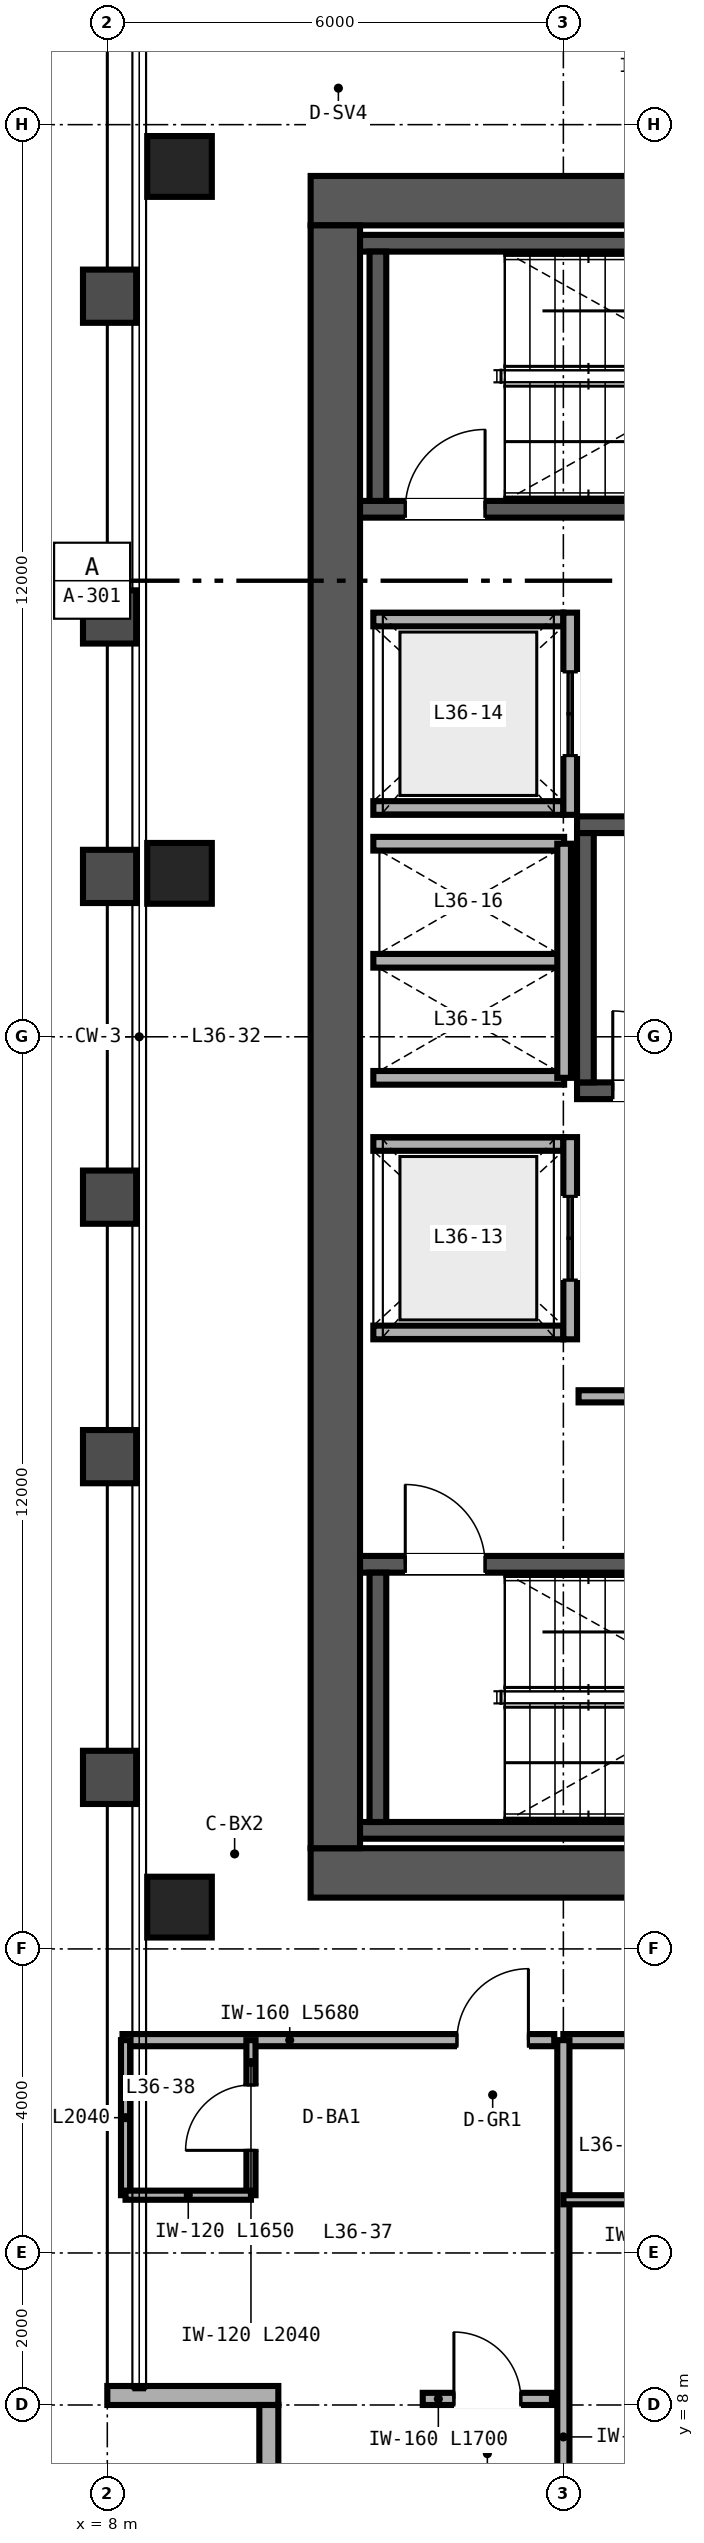
"""IFC4 building model, lengths in metres.
Left out: names, types, materials, properties, quantities, classifications, styles, units other than length and angle.
Written with IfcOpenShell. Run it as: python <this file> out.ifc"""

import sys

from ifc_helpers import new_model, si_unit, direction, frame, frame_2d, origin, origin_2d, place, context, subcontext, project, spatial, rectangle, hollow_rectangle, extrude, source, transform, mapped, element, fill, save


model = new_model("IFC4")
c1 = context("Model", 3, precision=1e-05, world=origin(), true_north=direction((0.0, 1.0)))
c2 = subcontext(c1, "Body", "Model", "MODEL_VIEW")
j1 = project(units=[si_unit("LENGTHUNIT", "METRE"), si_unit("PLANEANGLEUNIT", "RADIAN")], contexts=[c1])
p1 = place(None, origin())
s1 = spatial("IfcSite", under=j1, at=p1, CompositionType="ELEMENT")
p2 = place(p1, origin())
s2 = spatial("IfcBuilding", under=s1, at=p2, CompositionType="ELEMENT")
p3 = place(p2, frame((0.0, 0.0, 144.0)))
s3 = spatial("IfcBuildingStorey", under=s2, at=p3, CompositionType="ELEMENT", Elevation=144.0)
p4 = place(p3, frame((10.675, 15.0, 0.0), z_axis=(0.0, 0.0, 1.0), x_axis=(1.0, 0.0, 0.0)))
e1 = element("IfcWall", 1, at=p4, inside=s3, PredefinedType="SHEAR", context=c2, shape_type="SweptSolid", body=[
    extrude(rectangle(XDim=12.65, YDim=0.65, at=frame_2d((6.325, 0.0))), origin(), (0.0, 0.0, 1.0), 3.36),
])
p5 = place(p4, frame((10.225, 0.0, 0.0)))
e2 = element("IfcOpeningElement", 2, at=p5, cuts=e1, PredefinedType="OPENING", context=c2, shape_type="SweptSolid", body=[
    extrude(rectangle(XDim=1.0, YDim=2.15, at=frame_2d((0.5, 1.075))), frame((0.0, 0.335, 0.0), z_axis=(0.0, -1.0, 0.0), x_axis=(1.0, 0.0, 0.0)), (0.0, 0.0, 1.0), 0.67),
])
p6 = place(p3, frame((10.675, 37.0, 0.0), z_axis=(0.0, 0.0, 1.0), x_axis=(1.0, 0.0, 0.0)))
e3 = element("IfcWall", 3, at=p6, inside=s3, PredefinedType="SHEAR", context=c2, shape_type="SweptSolid", body=[
    extrude(rectangle(XDim=12.65, YDim=0.65, at=frame_2d((6.325, 0.0))), origin(), (0.0, 0.0, 1.0), 3.36),
])
p7 = place(p6, frame((10.425, 0.0, 0.0)))
e4 = element("IfcOpeningElement", 4, at=p7, cuts=e3, PredefinedType="OPENING", context=c2, shape_type="SweptSolid", body=[
    extrude(rectangle(XDim=1.0, YDim=2.15, at=frame_2d((0.5, 1.075))), frame((0.0, 0.335, 0.0), z_axis=(0.0, -1.0, 0.0), x_axis=(1.0, 0.0, 0.0)), (0.0, 0.0, 1.0), 0.67),
])
p8 = place(p3, frame((11.0, 15.325, 0.0), z_axis=(0.0, 0.0, 1.0), x_axis=(0.0, 1.0, 0.0)))
e5 = element("IfcWall", 5, at=p8, inside=s3, PredefinedType="SHEAR", context=c2, shape_type="SweptSolid", body=[
    extrude(rectangle(XDim=21.35, YDim=0.65, at=frame_2d((10.675, 0.0))), origin(), (0.0, 0.0, 1.0), 3.36),
])
p9 = place(p3, frame((11.325, 15.56, 0.0), z_axis=(0.0, 0.0, 1.0), x_axis=(1.0, 0.0, 0.0)))
e6 = element("IfcWall", 6, at=p9, inside=s3, PredefinedType="SHEAR", context=c2, shape_type="SweptSolid", body=[
    extrude(rectangle(XDim=7.985, YDim=0.22, at=frame_2d((3.993, 0.0))), origin(), (0.0, 0.0, 1.0), 3.4),
])
p10 = place(p3, frame((11.325, 19.06, 0.0), z_axis=(0.0, 0.0, 1.0), x_axis=(1.0, 0.0, 0.0)))
e7 = element("IfcWall", 7, at=p10, inside=s3, PredefinedType="SHEAR", context=c2, shape_type="SweptSolid", body=[
    extrude(rectangle(XDim=7.985, YDim=0.22, at=frame_2d((3.993, 0.0))), origin(), (0.0, 0.0, 1.0), 3.4),
])
p11 = place(p10, frame((0.595, 0.0, 0.0)))
e8 = element("IfcOpeningElement", 8, at=p11, cuts=e7, PredefinedType="OPENING", context=c2, shape_type="SweptSolid", body=[
    extrude(rectangle(XDim=1.05, YDim=2.15, at=frame_2d((0.525, 1.075))), frame((0.0, 0.12, 0.0), z_axis=(0.0, -1.0, 0.0), x_axis=(1.0, 0.0, 0.0)), (0.0, 0.0, 1.0), 0.24),
])
p12 = place(p3, frame((11.56, 15.67, 0.0), z_axis=(0.0, 0.0, 1.0), x_axis=(0.0, 1.0, 0.0)))
e9 = element("IfcWall", 9, at=p12, inside=s3, PredefinedType="SHEAR", context=c2, shape_type="SweptSolid", body=[
    extrude(rectangle(XDim=3.28, YDim=0.22, at=frame_2d((1.64, 0.0))), origin(), (0.0, 0.0, 1.0), 3.4),
])
p13 = place(p3, frame((11.325, 32.94, 0.0), z_axis=(0.0, 0.0, 1.0), x_axis=(1.0, 0.0, 0.0)))
e10 = element("IfcWall", 10, at=p13, inside=s3, PredefinedType="SHEAR", context=c2, shape_type="SweptSolid", body=[
    extrude(rectangle(XDim=7.985, YDim=0.22, at=frame_2d((3.993, 0.0))), origin(), (0.0, 0.0, 1.0), 3.4),
])
p14 = place(p13, frame((0.595, 0.0, 0.0)))
e11 = element("IfcOpeningElement", 11, at=p14, cuts=e10, PredefinedType="OPENING", context=c2, shape_type="SweptSolid", body=[
    extrude(rectangle(XDim=1.05, YDim=2.15, at=frame_2d((0.525, 1.075))), frame((0.0, 0.12, 0.0), z_axis=(0.0, -1.0, 0.0), x_axis=(1.0, 0.0, 0.0)), (0.0, 0.0, 1.0), 0.24),
])
p15 = place(p3, frame((11.325, 36.44, 0.0), z_axis=(0.0, 0.0, 1.0), x_axis=(1.0, 0.0, 0.0)))
e12 = element("IfcWall", 12, at=p15, inside=s3, PredefinedType="SHEAR", context=c2, shape_type="SweptSolid", body=[
    extrude(rectangle(XDim=7.985, YDim=0.22, at=frame_2d((3.993, 0.0))), origin(), (0.0, 0.0, 1.0), 3.4),
])
p16 = place(p3, frame((11.56, 33.05, 0.0), z_axis=(0.0, 0.0, 1.0), x_axis=(0.0, 1.0, 0.0)))
e13 = element("IfcWall", 13, at=p16, inside=s3, PredefinedType="SHEAR", context=c2, shape_type="SweptSolid", body=[
    extrude(rectangle(XDim=3.28, YDim=0.22, at=frame_2d((1.64, 0.0))), origin(), (0.0, 0.0, 1.0), 3.4),
])
p17 = place(p3, frame((14.18, 25.29, 0.0), z_axis=(0.0, 0.0, 1.0), x_axis=(1.0, 0.0, 0.0)))
e14 = element("IfcWall", 14, at=p17, inside=s3, PredefinedType="SHEAR", context=c2, shape_type="SweptSolid", body=[
    extrude(rectangle(XDim=8.495, YDim=0.22, at=frame_2d((4.248, 0.0))), origin(), (0.0, 0.0, 1.0), 3.4),
])
p18 = place(p17, frame((0.47, 0.0, 0.0)))
e15 = element("IfcOpeningElement", 15, at=p18, cuts=e14, PredefinedType="OPENING", context=c2, shape_type="SweptSolid", body=[
    extrude(rectangle(XDim=1.05, YDim=2.15, at=frame_2d((0.525, 1.075))), frame((0.0, 0.12, 0.0), z_axis=(0.0, -1.0, 0.0), x_axis=(1.0, 0.0, 0.0)), (0.0, 0.0, 1.0), 0.24),
])
p19 = place(p3, frame((14.18, 28.79, 0.0), z_axis=(0.0, 0.0, 1.0), x_axis=(1.0, 0.0, 0.0)))
e16 = element("IfcWall", 16, at=p19, inside=s3, PredefinedType="SHEAR", context=c2, shape_type="SweptSolid", body=[
    extrude(rectangle(XDim=8.495, YDim=0.22, at=frame_2d((4.248, 0.0))), origin(), (0.0, 0.0, 1.0), 3.4),
])
p20 = place(p3, frame((14.29, 25.4, 0.0), z_axis=(0.0, 0.0, 1.0), x_axis=(0.0, 1.0, 0.0)))
e17 = element("IfcWall", 17, at=p20, inside=s3, PredefinedType="SHEAR", context=c2, shape_type="SweptSolid", body=[
    extrude(rectangle(XDim=3.28, YDim=0.22, at=frame_2d((1.64, 0.0))), origin(), (0.0, 0.0, 1.0), 3.4),
])
m1 = source(origin(), c2, "Body", "SweptSolid", [
    extrude(hollow_rectangle(XDim=0.85, YDim=0.8, WallThickness=0.032, at=origin_2d()), origin(), (0.0, 0.0, 1.0), 3.36),
])
for number, where, z_axis, x_axis in (
    (18, (8.95, 14.55, 0.0), (0.0, 0.0, 1.0), (1.0, 0.0, 0.0)),
    (19, (8.95, 28.15, 0.0), (0.0, 0.0, 1.0), (1.0, 0.0, 0.0)),
    (20, (8.95, 37.45, 0.0), (0.0, 0.0, 1.0), (1.0, 0.0, 0.0)),
):
    element("IfcColumn", number, at=place(p3, frame(where, z_axis=z_axis, x_axis=x_axis)), inside=s3, PredefinedType="COLUMN", context=c2, shape_type="MappedRepresentation", body=[
        mapped(m1, transform((0.0, 0.0, 0.0), scale=1.0)),
    ])
p21 = place(p3, frame((8.0, 8.125, 0.0), z_axis=(0.0, 0.0, 1.0), x_axis=(1.0, 0.0, 0.0)))
e21 = element("IfcWall", 21, at=p21, inside=s3, PredefinedType="SOLIDWALL", context=c2, shape_type="SweptSolid", body=[
    extrude(rectangle(XDim=2.25, YDim=0.25, at=frame_2d((1.125, 0.0))), origin(), (0.0, 0.0, 1.0), 3.36),
])
p22 = place(p3, frame((10.125, 8.0, 0.0), z_axis=(0.0, 0.0, 1.0), x_axis=(0.0, -1.0, 0.0)))
e22 = element("IfcWall", 22, at=p22, inside=s3, PredefinedType="SOLIDWALL", context=c2, shape_type="SweptSolid", body=[
    extrude(rectangle(XDim=2.0, YDim=0.25, at=frame_2d((1.0, 0.0))), origin(), (0.0, 0.0, 1.0), 3.36),
])
for number, where, z_axis, x_axis in (
    (23, (11.5, 22.11, 0.0), (0.0, 0.0, 1.0), (1.0, 0.0, 0.0)),
    (24, (11.5, 24.59, 0.0), (0.0, 0.0, 1.0), (1.0, 0.0, 0.0)),
):
    element("IfcWall", number, at=place(p3, frame(where, z_axis=z_axis, x_axis=x_axis)), inside=s3, PredefinedType="SOLIDWALL", context=c2, shape_type="SweptSolid", body=[
        extrude(rectangle(XDim=2.5, YDim=0.18, at=frame_2d((1.25, 0.0))), origin(), (0.0, 0.0, 1.0), 3.36),
    ])
p23 = place(p3, frame((14.09, 22.02, 0.0), z_axis=(0.0, 0.0, 1.0), x_axis=(0.0, 1.0, 0.0)))
e25 = element("IfcWall", 25, at=p23, inside=s3, PredefinedType="SOLIDWALL", context=c2, shape_type="SweptSolid", body=[
    extrude(rectangle(XDim=2.66, YDim=0.18, at=frame_2d((1.33, 0.0))), origin(), (0.0, 0.0, 1.0), 3.36),
])
p24 = place(p23, frame((0.78, 0.0, 0.0)))
e26 = element("IfcOpeningElement", 26, at=p24, cuts=e25, PredefinedType="OPENING", context=c2, shape_type="SweptSolid", body=[
    extrude(rectangle(XDim=1.1, YDim=2.2, at=frame_2d((0.55, 1.1))), frame((0.0, 0.1, 0.0), z_axis=(0.0, -1.0, 0.0), x_axis=(1.0, 0.0, 0.0)), (0.0, 0.0, 1.0), 0.2),
])
for number, where, z_axis, x_axis in (
    (27, (11.5, 29.01, 0.0), (0.0, 0.0, 1.0), (1.0, 0.0, 0.0)),
    (28, (11.5, 31.49, 0.0), (0.0, 0.0, 1.0), (1.0, 0.0, 0.0)),
):
    element("IfcWall", number, at=place(p3, frame(where, z_axis=z_axis, x_axis=x_axis)), inside=s3, PredefinedType="SOLIDWALL", context=c2, shape_type="SweptSolid", body=[
        extrude(rectangle(XDim=2.5, YDim=0.18, at=frame_2d((1.25, 0.0))), origin(), (0.0, 0.0, 1.0), 3.36),
    ])
p25 = place(p3, frame((14.09, 28.92, 0.0), z_axis=(0.0, 0.0, 1.0), x_axis=(0.0, 1.0, 0.0)))
e29 = element("IfcWall", 29, at=p25, inside=s3, PredefinedType="SOLIDWALL", context=c2, shape_type="SweptSolid", body=[
    extrude(rectangle(XDim=2.66, YDim=0.18, at=frame_2d((1.33, 0.0))), origin(), (0.0, 0.0, 1.0), 3.36),
])
p26 = place(p25, frame((0.78, 0.0, 0.0)))
e30 = element("IfcOpeningElement", 30, at=p26, cuts=e29, PredefinedType="OPENING", context=c2, shape_type="SweptSolid", body=[
    extrude(rectangle(XDim=1.1, YDim=2.2, at=frame_2d((0.55, 1.1))), frame((0.0, 0.1, 0.0), z_axis=(0.0, -1.0, 0.0), x_axis=(1.0, 0.0, 0.0)), (0.0, 0.0, 1.0), 0.2),
])
for number, where, z_axis, x_axis in (
    (31, (11.5, 25.46, 0.0), (0.0, 0.0, 1.0), (1.0, 0.0, 0.0)),
    (32, (11.5, 27.0, 0.0), (0.0, 0.0, 1.0), (1.0, 0.0, 0.0)),
    (33, (11.5, 28.54, 0.0), (0.0, 0.0, 1.0), (1.0, 0.0, 0.0)),
):
    element("IfcWall", number, at=place(p3, frame(where, z_axis=z_axis, x_axis=x_axis)), inside=s3, PredefinedType="SOLIDWALL", context=c2, shape_type="SweptSolid", body=[
        extrude(rectangle(XDim=2.51, YDim=0.18, at=frame_2d((1.255, 0.0))), origin(), (0.0, 0.0, 1.0), 3.36),
    ])
p27 = place(p3, frame((14.01, 25.46, 0.0), z_axis=(0.0, 0.0, 1.0), x_axis=(0.0, 1.0, 0.0)))
e34 = element("IfcWall", 34, at=p27, inside=s3, PredefinedType="SOLIDWALL", context=c2, shape_type="SweptSolid", body=[
    extrude(rectangle(XDim=3.08, YDim=0.18, at=frame_2d((1.54, 0.0))), origin(), (0.0, 0.0, 1.0), 3.36),
])
p28 = place(p3, frame((14.2, 21.27, 0.0), z_axis=(0.0, 0.0, 1.0), x_axis=(1.0, 0.0, 0.0)))
e35 = element("IfcWall", 35, at=p28, inside=s3, PredefinedType="PARTITIONING", context=c2, shape_type="SweptSolid", body=[
    extrude(rectangle(XDim=4.58, YDim=0.16, at=frame_2d((2.29, 0.0))), origin(), (0.0, 0.0, 1.0), 3.36),
])
p29 = place(p28, frame((1.8, 0.0, 0.0)))
e36 = element("IfcOpeningElement", 36, at=p29, cuts=e35, PredefinedType="OPENING", context=c2, shape_type="SweptSolid", body=[
    extrude(rectangle(XDim=1.0, YDim=2.15, at=frame_2d((0.5, 1.075))), frame((0.0, 0.09, 0.0), z_axis=(0.0, -1.0, 0.0), x_axis=(1.0, 0.0, 0.0)), (0.0, 0.0, 1.0), 0.18),
])
p30 = place(p3, frame((8.2, 12.8, 0.0), z_axis=(0.0, 0.0, 1.0), x_axis=(1.0, 0.0, 0.0)))
e37 = element("IfcWall", 37, at=p30, inside=s3, PredefinedType="PARTITIONING", context=c2, shape_type="SweptSolid", body=[
    extrude(rectangle(XDim=5.68, YDim=0.16, at=frame_2d((2.84, 0.0))), origin(), (0.0, 0.0, 1.0), 3.36),
])
p31 = place(p30, frame((4.4, 0.0, 0.0)))
e38 = element("IfcOpeningElement", 38, at=p31, cuts=e37, PredefinedType="OPENING", context=c2, shape_type="SweptSolid", body=[
    extrude(rectangle(XDim=0.94, YDim=2.15, at=frame_2d((0.47, 1.075))), frame((0.0, 0.09, 0.0), z_axis=(0.0, -1.0, 0.0), x_axis=(1.0, 0.0, 0.0)), (0.0, 0.0, 1.0), 0.18),
])
p32 = place(p3, frame((9.89, 10.76, 0.0), z_axis=(0.0, 0.0, 1.0), x_axis=(0.0, 1.0, 0.0)))
e39 = element("IfcWall", 39, at=p32, inside=s3, PredefinedType="PARTITIONING", context=c2, shape_type="SweptSolid", body=[
    extrude(rectangle(XDim=2.04, YDim=0.12, at=frame_2d((1.02, 0.0))), origin(), (0.0, 0.0, 1.0), 3.36),
])
p33 = place(p32, frame((0.59, 0.0, 0.0)))
e40 = element("IfcOpeningElement", 40, at=p33, cuts=e39, PredefinedType="OPENING", context=c2, shape_type="SweptSolid", body=[
    extrude(rectangle(XDim=0.86, YDim=2.1, at=frame_2d((0.43, 1.05))), frame((0.0, 0.07, 0.0), z_axis=(0.0, -1.0, 0.0), x_axis=(1.0, 0.0, 0.0)), (0.0, 0.0, 1.0), 0.14),
])
p34 = place(p3, frame((8.24, 10.76, 0.0), z_axis=(0.0, 0.0, 1.0), x_axis=(0.0, 1.0, 0.0)))
e41 = element("IfcWall", 41, at=p34, inside=s3, PredefinedType="PARTITIONING", context=c2, shape_type="SweptSolid", body=[
    extrude(rectangle(XDim=2.04, YDim=0.12, at=frame_2d((1.02, 0.0))), origin(), (0.0, 0.0, 1.0), 3.36),
])
p35 = place(p3, frame((8.24, 10.76, 0.0), z_axis=(0.0, 0.0, 1.0), x_axis=(1.0, 0.0, 0.0)))
e42 = element("IfcWall", 42, at=p35, inside=s3, PredefinedType="PARTITIONING", context=c2, shape_type="SweptSolid", body=[
    extrude(rectangle(XDim=1.65, YDim=0.12, at=frame_2d((0.825, 0.0))), origin(), (0.0, 0.0, 1.0), 3.36),
])
p36 = place(p3, frame((12.15, 8.08, 0.0), z_axis=(0.0, 0.0, 1.0), x_axis=(1.0, 0.0, 0.0)))
e43 = element("IfcWall", 43, at=p36, inside=s3, PredefinedType="PARTITIONING", context=c2, shape_type="SweptSolid", body=[
    extrude(rectangle(XDim=1.7, YDim=0.16, at=frame_2d((0.85, 0.0))), origin(), (0.0, 0.0, 1.0), 3.36),
])
p37 = place(p36, frame((0.41, 0.0, 0.0)))
e44 = element("IfcOpeningElement", 44, at=p37, cuts=e43, PredefinedType="OPENING", context=c2, shape_type="SweptSolid", body=[
    extrude(rectangle(XDim=0.88, YDim=2.15, at=frame_2d((0.44, 1.075))), frame((0.0, 0.09, 0.0), z_axis=(0.0, -1.0, 0.0), x_axis=(1.0, 0.0, 0.0)), (0.0, 0.0, 1.0), 0.18),
])
p38 = place(p3, frame((14.0, 12.8, 0.0), z_axis=(0.0, 0.0, 1.0), x_axis=(1.0, 0.0, 0.0)))
e45 = element("IfcWall", 45, at=p38, inside=s3, PredefinedType="PARTITIONING", context=c2, shape_type="SweptSolid", body=[
    extrude(rectangle(XDim=36.0, YDim=0.16, at=frame_2d((18.0, 0.0))), origin(), (0.0, 0.0, 1.0), 2.581),
])
p39 = place(p38, frame((5.5, 0.0, 0.0)))
e46 = element("IfcOpeningElement", 46, at=p39, cuts=e45, PredefinedType="OPENING", context=c2, shape_type="SweptSolid", body=[
    extrude(rectangle(XDim=0.98, YDim=2.2, at=frame_2d((0.49, 1.1))), frame((0.0, 0.09, 0.0), z_axis=(0.0, -1.0, 0.0), x_axis=(1.0, 0.0, 0.0)), (0.0, 0.0, 1.0), 0.18),
])
p40 = place(p38, frame((10.2, 0.0, 0.0)))
e47 = element("IfcOpeningElement", 47, at=p40, cuts=e45, PredefinedType="OPENING", context=c2, shape_type="SweptSolid", body=[
    extrude(rectangle(XDim=0.96, YDim=2.15, at=frame_2d((0.48, 1.075))), frame((0.0, 0.09, 0.0), z_axis=(0.0, -1.0, 0.0), x_axis=(1.0, 0.0, 0.0)), (0.0, 0.0, 1.0), 0.18),
])
p41 = place(p38, frame((16.72, 0.0, 0.0)))
e48 = element("IfcOpeningElement", 48, at=p41, cuts=e45, PredefinedType="OPENING", context=c2, shape_type="SweptSolid", body=[
    extrude(rectangle(XDim=0.96, YDim=2.15, at=frame_2d((0.48, 1.075))), frame((0.0, 0.09, 0.0), z_axis=(0.0, -1.0, 0.0), x_axis=(1.0, 0.0, 0.0)), (0.0, 0.0, 1.0), 0.18),
])
p42 = place(p38, frame((27.14, 0.0, 0.0)))
e49 = element("IfcOpeningElement", 49, at=p42, cuts=e45, PredefinedType="OPENING", context=c2, shape_type="SweptSolid", body=[
    extrude(rectangle(XDim=0.94, YDim=2.15, at=frame_2d((0.47, 1.075))), frame((0.0, 0.09, 0.0), z_axis=(0.0, -1.0, 0.0), x_axis=(1.0, 0.0, 0.0)), (0.0, 0.0, 1.0), 0.18),
])
p43 = place(p38, frame((34.74, 0.0, 0.0)))
e50 = element("IfcOpeningElement", 50, at=p43, cuts=e45, PredefinedType="OPENING", context=c2, shape_type="SweptSolid", body=[
    extrude(rectangle(XDim=0.94, YDim=2.15, at=frame_2d((0.47, 1.075))), frame((0.0, 0.09, 0.0), z_axis=(0.0, -1.0, 0.0), x_axis=(1.0, 0.0, 0.0)), (0.0, 0.0, 1.0), 0.18),
])
p44 = place(p3, frame((14.0, 2.36, 0.0), z_axis=(0.0, 0.0, 1.0), x_axis=(0.0, 1.0, 0.0)))
e51 = element("IfcWall", 51, at=p44, inside=s3, PredefinedType="PARTITIONING", context=c2, shape_type="SweptSolid", body=[
    extrude(rectangle(XDim=10.44, YDim=0.16, at=frame_2d((5.22, 0.0))), origin(), (0.0, 0.0, 1.0), 2.667),
])
p45 = place(p3, frame((14.0, 10.7, 0.0), z_axis=(0.0, 0.0, 1.0), x_axis=(1.0, 0.0, 0.0)))
e52 = element("IfcWall", 52, at=p45, inside=s3, PredefinedType="PARTITIONING", context=c2, shape_type="SweptSolid", body=[
    extrude(rectangle(XDim=1.95, YDim=0.12, at=frame_2d((0.975, 0.0))), origin(), (0.0, 0.0, 1.0), 3.36),
])
m2 = source(origin(), c2, "Body", "SweptSolid", [
    extrude(rectangle(XDim=1.05, YDim=2.15, at=frame_2d((0.525, 1.075))), frame((0.0, 0.025, 0.0), z_axis=(0.0, -1.0, 0.0), x_axis=(1.0, 0.0, 0.0)), (0.0, 0.0, 1.0), 0.05),
])
p46 = place(p11, origin())
e53 = element("IfcDoor", 53, at=p46, inside=s3, OperationType="SINGLE_SWING_LEFT", PredefinedType="DOOR", context=c2, shape_type="MappedRepresentation", body=[
    mapped(m2, transform((0.0, 0.0, 0.0), scale=1.0)),
])
fill(e8, e53)
p47 = place(p14, origin())
e54 = element("IfcDoor", 54, at=p47, inside=s3, OperationType="SINGLE_SWING_RIGHT", PredefinedType="DOOR", context=c2, shape_type="MappedRepresentation", body=[
    mapped(m2, transform((0.0, 0.0, 0.0), scale=1.0)),
])
fill(e11, e54)
p48 = place(p18, origin())
e55 = element("IfcDoor", 55, at=p48, inside=s3, OperationType="SINGLE_SWING_LEFT", PredefinedType="DOOR", context=c2, shape_type="MappedRepresentation", body=[
    mapped(m2, transform((0.0, 0.0, 0.0), scale=1.0)),
])
fill(e15, e55)
m3 = source(origin(), c2, "Body", "SweptSolid", [
    extrude(rectangle(XDim=1.1, YDim=2.2, at=frame_2d((0.55, 1.1))), frame((0.0, 0.025, 0.0), z_axis=(0.0, -1.0, 0.0), x_axis=(1.0, 0.0, 0.0)), (0.0, 0.0, 1.0), 0.05),
])
p49 = place(p24, origin())
e56 = element("IfcDoor", 56, at=p49, inside=s3, OperationType="DOUBLE_DOOR_SLIDING", PredefinedType="DOOR", context=c2, shape_type="MappedRepresentation", body=[
    mapped(m3, transform((0.0, 0.0, 0.0), scale=1.0)),
])
fill(e26, e56)
p50 = place(p26, origin())
e57 = element("IfcDoor", 57, at=p50, inside=s3, OperationType="DOUBLE_DOOR_SLIDING", PredefinedType="DOOR", context=c2, shape_type="MappedRepresentation", body=[
    mapped(m3, transform((0.0, 0.0, 0.0), scale=1.0)),
])
fill(e30, e57)
m4 = source(origin(), c2, "Body", "SweptSolid", [
    extrude(rectangle(XDim=0.86, YDim=2.1, at=frame_2d((0.43, 1.05))), frame((0.0, 0.025, 0.0), z_axis=(0.0, -1.0, 0.0), x_axis=(1.0, 0.0, 0.0)), (0.0, 0.0, 1.0), 0.05),
])
p51 = place(p33, origin())
e58 = element("IfcDoor", 58, at=p51, inside=s3, OperationType="SINGLE_SWING_LEFT", PredefinedType="DOOR", context=c2, shape_type="MappedRepresentation", body=[
    mapped(m4, transform((0.0, 0.0, 0.0), scale=1.0)),
])
fill(e40, e58)
m5 = source(origin(), c2, "Body", "SweptSolid", [
    extrude(rectangle(XDim=0.94, YDim=2.15, at=frame_2d((0.47, 1.075))), frame((0.0, 0.025, 0.0), z_axis=(0.0, -1.0, 0.0), x_axis=(1.0, 0.0, 0.0)), (0.0, 0.0, 1.0), 0.05),
])
p52 = place(p31, origin())
e59 = element("IfcDoor", 59, at=p52, inside=s3, OperationType="SINGLE_SWING_RIGHT", PredefinedType="DOOR", context=c2, shape_type="MappedRepresentation", body=[
    mapped(m5, transform((0.0, 0.0, 0.0), scale=1.0)),
])
fill(e38, e59)
m6 = source(origin(), c2, "Body", "SweptSolid", [
    extrude(rectangle(XDim=0.88, YDim=2.15, at=frame_2d((0.44, 1.075))), frame((0.0, 0.025, 0.0), z_axis=(0.0, -1.0, 0.0), x_axis=(1.0, 0.0, 0.0)), (0.0, 0.0, 1.0), 0.05),
])
p53 = place(p37, origin())
e60 = element("IfcDoor", 60, at=p53, inside=s3, OperationType="SINGLE_SWING_LEFT", PredefinedType="DOOR", context=c2, shape_type="MappedRepresentation", body=[
    mapped(m6, transform((0.0, 0.0, 0.0), scale=1.0)),
])
fill(e44, e60)
save(model, sys.argv[1])
